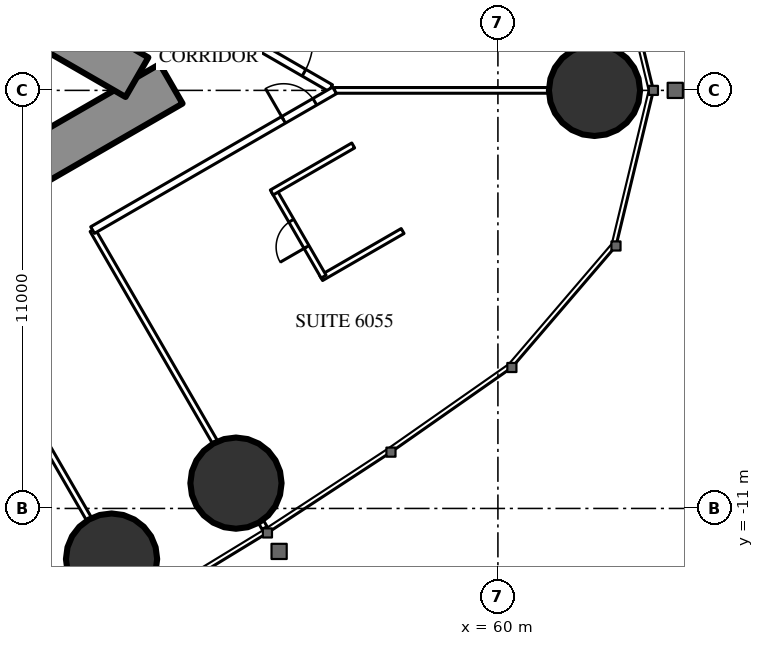
"""IFC4 building model, lengths in metres.
Left out: names, types, materials, properties, quantities, classifications, styles, units other than length and angle.
Written with IfcOpenShell. Run it as: python <this file> out.ifc"""

import sys

from ifc_helpers import new_model, si_unit, direction, frame, frame_2d, origin, origin_2d, place, context, subcontext, project, spatial, rectangle, circle, extrude, element, fill, save


model = new_model("IFC4")
c1 = context("Model", 3, precision=1e-05, world=origin(), true_north=direction((0.0, 1.0)))
c2 = subcontext(c1, "Body", "Model", "MODEL_VIEW")
j1 = project(units=[si_unit("LENGTHUNIT", "METRE"), si_unit("PLANEANGLEUNIT", "RADIAN")], contexts=[c1])
p1 = place(None, origin())
s1 = spatial("IfcSite", under=j1, at=p1, CompositionType="ELEMENT")
p2 = place(p1, origin())
s2 = spatial("IfcBuilding", under=s1, at=p2, CompositionType="ELEMENT")
p3 = place(p2, frame((0.0, 0.0, 226.1)))
s3 = spatial("IfcBuildingStorey", under=s2, at=p3, CompositionType="ELEMENT", Elevation=226.1)
for number, where, z_axis, x_axis in (
    (1, (62.542, 0.0, 0.0), (0.0, 0.0, 1.0), (1.0, 0.0, 0.0)),
    (2, (49.834, -12.332, 0.0), (0.0, 0.0, 1.0), (1.0, 0.0, 0.0)),
    (3, (53.108, -10.334, 0.0), (0.0, 0.0, 1.0), (1.0, 0.0, 0.0)),
):
    element("IfcColumn", number, at=place(p3, frame(where, z_axis=z_axis, x_axis=x_axis)), inside=s3, PredefinedType="COLUMN", context=c2, shape_type="SweptSolid", body=[
        extrude(circle(Radius=1.2, at=origin_2d()), origin(), (0.0, 0.0, 1.0), 3.6),
    ])
p4 = place(p3, frame((27.2, -13.8, 0.0), z_axis=(0.0, 0.0, 1.0), x_axis=(0.866027159892, 0.499996958321, 0.0)))
e4 = element("IfcWall", 4, at=p4, inside=s3, PredefinedType="SHEAR", context=c2, shape_type="SweptSolid", body=[
    extrude(rectangle(XDim=27.947, YDim=1.2, at=frame_2d((13.973, 0.0))), origin(), (0.0, 0.0, 1.0), 3.6),
])
p5 = place(p4, frame((4.6, 0.0, 0.0)))
e5 = element("IfcOpeningElement", 5, at=p5, cuts=e4, PredefinedType="OPENING", context=c2, shape_type="SweptSolid", body=[
    extrude(rectangle(XDim=1.0, YDim=2.2, at=frame_2d((0.5, 1.1))), frame((0.0, 0.61, 0.0), z_axis=(0.0, -1.0, 0.0), x_axis=(1.0, 0.0, 0.0)), (0.0, 0.0, 1.0), 1.22),
])
p6 = place(p4, frame((13.395, 0.0, 0.0)))
e6 = element("IfcOpeningElement", 6, at=p6, cuts=e4, PredefinedType="OPENING", context=c2, shape_type="SweptSolid", body=[
    extrude(rectangle(XDim=1.8, YDim=2.2, at=frame_2d((0.9, 1.1))), frame((0.0, 0.61, 0.0), z_axis=(0.0, -1.0, 0.0), x_axis=(1.0, 0.0, 0.0)), (0.0, 0.0, 1.0), 1.22),
])
p7 = place(p3, frame((27.2, 13.8, 0.0), z_axis=(0.0, 0.0, 1.0), x_axis=(0.866024515034, -0.500001539357, 0.0)))
e7 = element("IfcWall", 7, at=p7, inside=s3, PredefinedType="SHEAR", context=c2, shape_type="SweptSolid", body=[
    extrude(rectangle(XDim=26.907, YDim=1.2, at=frame_2d((13.454, 0.0))), origin(), (0.0, 0.0, 1.0), 3.6),
])
p8 = place(p7, frame((4.6, 0.0, 0.0)))
e8 = element("IfcOpeningElement", 8, at=p8, cuts=e7, PredefinedType="OPENING", context=c2, shape_type="SweptSolid", body=[
    extrude(rectangle(XDim=1.0, YDim=2.2, at=frame_2d((0.5, 1.1))), frame((0.0, 0.61, 0.0), z_axis=(0.0, -1.0, 0.0), x_axis=(1.0, 0.0, 0.0)), (0.0, 0.0, 1.0), 1.22),
])
p9 = place(p7, frame((13.395, 0.0, 0.0)))
e9 = element("IfcOpeningElement", 9, at=p9, cuts=e7, PredefinedType="OPENING", context=c2, shape_type="SweptSolid", body=[
    extrude(rectangle(XDim=1.8, YDim=2.2, at=frame_2d((0.9, 1.1))), frame((0.0, 0.61, 0.0), z_axis=(0.0, -1.0, 0.0), x_axis=(1.0, 0.0, 0.0)), (0.0, 0.0, 1.0), 1.22),
])
p10 = place(p3, frame((45.973, -5.617, 0.0), z_axis=(0.0, 0.0, 1.0), x_axis=(0.499985856986, -0.866033569104, 0.0)))
e10 = element("IfcWall", 10, at=p10, inside=s3, PredefinedType="PARTITIONING", context=c2, shape_type="SweptSolid", body=[
    extrude(rectangle(XDim=6.526, YDim=0.15, at=frame_2d((3.263, 0.0))), origin(), (0.0, 0.0, 1.0), 2.45),
])
p11 = place(p3, frame((49.335, -3.676, 0.0), z_axis=(0.0, 0.0, 1.0), x_axis=(0.500000613642, -0.866025049498, 0.0)))
e11 = element("IfcWall", 11, at=p11, inside=s3, PredefinedType="PARTITIONING", context=c2, shape_type="SweptSolid", body=[
    extrude(rectangle(XDim=6.433, YDim=0.15, at=frame_2d((3.216, 0.0))), origin(), (0.0, 0.0, 1.0), 2.45),
])
p12 = place(p3, frame((53.771, -11.36, 0.0), z_axis=(0.0, 0.0, 1.0), x_axis=(0.499524978789, -0.866299483762, 0.0)))
e12 = element("IfcWall", 12, at=p12, inside=s3, PredefinedType="PARTITIONING", context=c2, shape_type="SweptSolid", body=[
    extrude(rectangle(XDim=0.178, YDim=0.15, at=frame_2d((0.089, 0.0))), origin(), (0.0, 0.0, 1.0), 2.45),
])
p13 = place(p3, frame((55.702, 0.0, 0.0), z_axis=(0.0, 0.0, 1.0), x_axis=(1.0, 0.0, 0.0)))
e13 = element("IfcWall", 13, at=p13, inside=s3, PredefinedType="PARTITIONING", context=c2, shape_type="SweptSolid", body=[
    extrude(rectangle(XDim=5.619, YDim=0.15, at=frame_2d((2.81, 0.0))), origin(), (0.0, 0.0, 1.0), 2.45),
])
p14 = place(p3, frame((52.639, 1.769, 0.0), z_axis=(0.0, 0.0, 1.0), x_axis=(0.866027340901, -0.4999966448, 0.0)))
e14 = element("IfcWall", 14, at=p14, inside=s3, PredefinedType="PARTITIONING", context=c2, shape_type="SweptSolid", body=[
    extrude(rectangle(XDim=3.417, YDim=0.2, at=frame_2d((1.708, 0.0))), origin(), (0.0, 0.0, 1.0), 3.35),
])
p15 = place(p14, frame((0.809, 0.0, 0.0)))
e15 = element("IfcOpeningElement", 15, at=p15, cuts=e14, PredefinedType="OPENING", context=c2, shape_type="SweptSolid", body=[
    extrude(rectangle(XDim=1.8, YDim=2.2, at=frame_2d((0.9, 1.1))), frame((0.0, 0.11, 0.0), z_axis=(0.0, -1.0, 0.0), x_axis=(1.0, 0.0, 0.0)), (0.0, 0.0, 1.0), 0.22),
])
p16 = place(p3, frame((55.349, -4.938, 0.0), z_axis=(0.0, 0.0, 1.0), x_axis=(0.866006523861, 0.500032699561, 0.0)))
e16 = element("IfcWall", 16, at=p16, inside=s3, PredefinedType="PARTITIONING", context=c2, shape_type="SweptSolid", body=[
    extrude(rectangle(XDim=2.475, YDim=0.15, at=frame_2d((1.237, 0.0))), origin(), (0.0, 0.0, 1.0), 3.35),
])
p17 = place(p3, frame((54.114, -2.649, 0.0), z_axis=(0.0, 0.0, 1.0), x_axis=(0.500006934395, -0.866021400173, 0.0)))
e17 = element("IfcWall", 17, at=p17, inside=s3, PredefinedType="PARTITIONING", context=c2, shape_type="SweptSolid", body=[
    extrude(rectangle(XDim=2.6, YDim=0.15, at=frame_2d((1.3, 0.0))), origin(), (0.0, 0.0, 1.0), 3.35),
])
p18 = place(p17, frame((0.9, 0.0, 0.0)))
e18 = element("IfcOpeningElement", 18, at=p18, cuts=e17, PredefinedType="OPENING", context=c2, shape_type="SweptSolid", body=[
    extrude(rectangle(XDim=0.8, YDim=2.2, at=frame_2d((0.4, 1.1))), frame((0.0, 0.085, 0.0), z_axis=(0.0, -1.0, 0.0), x_axis=(1.0, 0.0, 0.0)), (0.0, 0.0, 1.0), 0.17),
])
p19 = place(p3, frame((54.049, -2.687, 0.0), z_axis=(0.0, 0.0, 1.0), x_axis=(0.866006523861, 0.500032699561, 0.0)))
e19 = element("IfcWall", 19, at=p19, inside=s3, PredefinedType="PARTITIONING", context=c2, shape_type="SweptSolid", body=[
    extrude(rectangle(XDim=2.475, YDim=0.15, at=frame_2d((1.237, 0.0))), origin(), (0.0, 0.0, 1.0), 3.35),
])
p20 = place(p3, frame((49.335, -3.676, 0.0), z_axis=(0.0, 0.0, 1.0), x_axis=(0.866021344046, 0.500007031608, 0.0)))
e20 = element("IfcWall", 20, at=p20, inside=s3, PredefinedType="PARTITIONING", context=c2, shape_type="SweptSolid", body=[
    extrude(rectangle(XDim=7.352, YDim=0.2, at=frame_2d((3.676, 0.0))), origin(), (0.0, 0.0, 1.0), 3.35),
])
p21 = place(p20, frame((5.802, 0.0, 0.0)))
e21 = element("IfcOpeningElement", 21, at=p21, cuts=e20, PredefinedType="OPENING", context=c2, shape_type="SweptSolid", body=[
    extrude(rectangle(XDim=0.95, YDim=2.2, at=frame_2d((0.475, 1.1))), frame((0.0, 0.11, 0.0), z_axis=(0.0, -1.0, 0.0), x_axis=(1.0, 0.0, 0.0)), (0.0, 0.0, 1.0), 0.22),
])
p22 = place(p18, origin())
e22 = element("IfcDoor", 22, at=p22, inside=s3, OperationType="SINGLE_SWING_RIGHT", PredefinedType="DOOR", context=c2, shape_type="SweptSolid", body=[
    extrude(rectangle(XDim=0.8, YDim=2.2, at=frame_2d((0.4, 1.1))), frame((0.0, 0.025, 0.0), z_axis=(0.0, -1.0, 0.0), x_axis=(1.0, 0.0, 0.0)), (0.0, 0.0, 1.0), 0.05),
])
fill(e18, e22)
p23 = place(p21, origin())
e23 = element("IfcDoor", 23, at=p23, inside=s3, OperationType="SINGLE_SWING_LEFT", PredefinedType="DOOR", context=c2, shape_type="SweptSolid", body=[
    extrude(rectangle(XDim=0.95, YDim=2.2, at=frame_2d((0.475, 1.1))), frame((0.0, 0.025, 0.0), z_axis=(0.0, -1.0, 0.0), x_axis=(1.0, 0.0, 0.0)), (0.0, 0.0, 1.0), 0.05),
])
fill(e21, e23)
p24 = place(p15, origin())
e24 = element("IfcDoor", 24, at=p24, inside=s3, OperationType="DOUBLE_DOOR_SINGLE_SWING", PredefinedType="DOOR", context=c2, shape_type="SweptSolid", body=[
    extrude(rectangle(XDim=1.8, YDim=2.2, at=frame_2d((0.9, 1.1))), frame((0.0, 0.025, 0.0), z_axis=(0.0, -1.0, 0.0), x_axis=(1.0, 0.0, 0.0)), (0.0, 0.0, 1.0), 0.05),
])
fill(e15, e24)
save(model, sys.argv[1])
